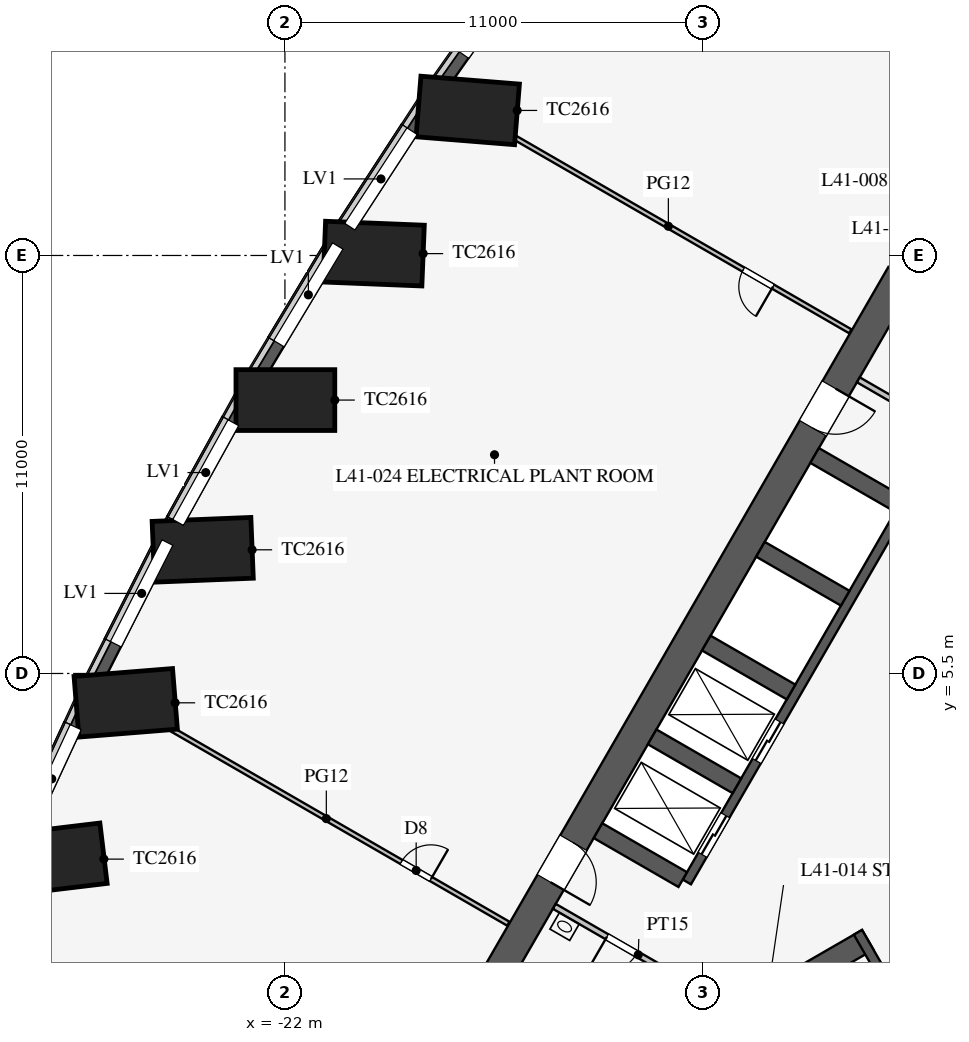
"""IFC4 building model, lengths in metres.
Left out: names, types, materials, properties, quantities, classifications, styles, units other than length and angle.
Written with IfcOpenShell. Run it as: python <this file> out.ifc"""

import sys

from ifc_helpers import new_model, si_unit, direction, frame, frame_2d, origin, origin_2d, place, context, subcontext, project, spatial, polyline, rectangle, outline, extrude, clip, halfspace, element, fill, save


model = new_model("IFC4")
c1 = context("Model", 3, precision=1e-05, world=origin(), true_north=direction((0.0, 1.0)))
c2 = subcontext(c1, "Body", "Model", "MODEL_VIEW")
j1 = project(units=[si_unit("LENGTHUNIT", "METRE"), si_unit("PLANEANGLEUNIT", "RADIAN")], contexts=[c1])
p1 = place(None, origin())
s1 = spatial("IfcSite", under=j1, at=p1, CompositionType="ELEMENT")
p2 = place(p1, origin())
s2 = spatial("IfcBuilding", under=s1, at=p2, CompositionType="ELEMENT")
p3 = place(p2, frame((0.0, 0.0, 178.7)))
s3 = spatial("IfcBuildingStorey", under=s2, at=p3, CompositionType="ELEMENT", Elevation=178.7)
p4 = place(p3, frame((-17.43, 20.456, 0.0), z_axis=(0.195428167391, -0.112817153021, 0.974207432416), x_axis=(-0.565774582808, -0.824362784845, 0.018031095686)))
e1 = element("IfcColumn", 1, at=p4, inside=s3, PredefinedType="COLUMN", context=c2, shape_type="Clipping", body=[
    clip(clip(extrude(rectangle(XDim=2.6, YDim=1.6, at=origin_2d()), origin(), (0.0, 0.0, 1.0), 6.159), halfspace(frame((0.0, 0.0, 0.21), z_axis=(1.0393805708591025e-05, 1.5065167287081627e-05, 0.9999999998325048), x_axis=(0.0, 0.9999999998865204, -1.5065167287895381e-05)), True)), halfspace(frame((0.0, 0.0, 5.949), z_axis=(-1.0393805708591025e-05, -1.5065167287081627e-05, -0.9999999998325048), x_axis=(0.0, -0.9999999998865204, 1.5065167287895381e-05)), True)),
])
p5 = place(p3, frame((-19.893, 16.681, 0.0), z_axis=(0.186289343802, -0.107569380049, 0.976588505391), x_axis=(-0.533517685828, -0.845745042504, 0.008614057662)))
e2 = element("IfcColumn", 2, at=p5, inside=s3, PredefinedType="COLUMN", context=c2, shape_type="Clipping", body=[
    clip(clip(extrude(rectangle(XDim=2.6, YDim=1.6, at=origin_2d()), origin(), (0.0, 0.0, 1.0), 6.144), halfspace(frame((0.0, 0.0, 0.188), z_axis=(-1.3253644547951e-05, 2.4571096812753272e-06, 0.9999999999091518), x_axis=(0.0, 0.9999999999969813, -2.457109681491134e-06)), True)), halfspace(frame((0.0, 0.0, 5.955), z_axis=(1.3253644547951e-05, -2.4571096812753272e-06, -0.9999999999091518), x_axis=(0.0, -0.9999999999969813, 2.457109681491134e-06)), True)),
])
p6 = place(p3, frame((-22.213, 12.825, 0.0), z_axis=(0.183253727016, -0.105824255119, 0.97735321075), x_axis=(-0.500080332001, -0.865979019114, 0.0)))
e3 = element("IfcColumn", 3, at=p6, inside=s3, PredefinedType="COLUMN", context=c2, shape_type="Clipping", body=[
    clip(clip(extrude(rectangle(XDim=2.6, YDim=1.6, at=origin_2d()), origin(), (0.0, 0.0, 1.0), 6.139), halfspace(frame((0.0, 0.0, 0.174), z_axis=(-1.962931837797242e-05, -1.1078215543997016e-05, 0.9999999997459816), x_axis=(0.0, 0.9999999999386366, 1.107821554613129e-05)), True)), halfspace(frame((0.0, 0.0, 5.965), z_axis=(1.962931837797242e-05, 1.1078215543997016e-05, -0.9999999997459816), x_axis=(0.0, -0.9999999999386366, -1.107821554613129e-05)), True)),
])
p7 = place(p3, frame((-24.393, 8.887, 0.0), z_axis=(0.186289343802, -0.107569380049, 0.976588505391), x_axis=(-0.465785984336, -0.884855476791, -0.008614057662)))
e4 = element("IfcColumn", 4, at=p7, inside=s3, PredefinedType="COLUMN", context=c2, shape_type="Clipping", body=[
    clip(clip(extrude(rectangle(XDim=2.6, YDim=1.6, at=origin_2d()), origin(), (0.0, 0.0, 1.0), 6.144), halfspace(frame((0.0, 0.0, 0.189), z_axis=(-1.3014513908404109e-05, 3.509830411391191e-06, 0.9999999999091518), x_axis=(0.0, 0.9999999999938406, -3.5098304116884342e-06)), True)), halfspace(frame((0.0, 0.0, 5.955), z_axis=(1.3014513908404109e-05, -3.509830411391191e-06, -0.9999999999091518), x_axis=(0.0, -0.9999999999938406, 3.5098304116884342e-06)), True)),
])
p8 = place(p3, frame((-26.43, 4.867, 0.0), z_axis=(0.195428167391, -0.112817153021, 0.974207432416), x_axis=(-0.430939361595, -0.902200723906, -0.018031095686)))
e5 = element("IfcColumn", 5, at=p8, inside=s3, PredefinedType="COLUMN", context=c2, shape_type="Clipping", body=[
    clip(clip(extrude(rectangle(XDim=2.6, YDim=1.6, at=origin_2d()), origin(), (0.0, 0.0, 1.0), 6.159), halfspace(frame((0.0, 0.0, 0.21), z_axis=(1.266096880684145e-05, 1.3217046998748039e-05, 0.9999999998325048), x_axis=(0.0, 0.9999999999126549, -1.3217046999807387e-05)), True)), halfspace(frame((0.0, 0.0, 5.949), z_axis=(-1.266096880684145e-05, -1.3217046998748039e-05, -0.9999999998325048), x_axis=(0.0, -0.9999999999126549, 1.3217046999807387e-05)), True)),
])
p9 = place(p3, frame((-28.325, 0.765, 0.0), z_axis=(0.210679538915, -0.121600535668, 0.969962598046), x_axis=(-0.396030042984, -0.91777825869, -0.029039162011)))
e6 = element("IfcColumn", 6, at=p9, inside=s3, PredefinedType="COLUMN", context=c2, shape_type="Clipping", body=[
    clip(clip(extrude(rectangle(XDim=2.6, YDim=1.6, at=origin_2d()), origin(), (0.0, 0.0, 1.0), 6.186), halfspace(frame((0.0, 0.0, 0.239), z_axis=(3.0378180671815358e-05, -3.820048547931165e-06, 0.9999999995312867), x_axis=(0.0, 0.9999999999927036, 3.8200485496938e-06)), True)), halfspace(frame((0.0, 0.0, 5.947), z_axis=(-3.0378180671815358e-05, 3.820048547931165e-06, -0.9999999995312867), x_axis=(0.0, -0.9999999999927036, -3.8200485496938e-06)), True)),
])
p10 = place(p3, frame((-30.077, -3.42, 0.0), z_axis=(0.231966146532, -0.13391860006, 0.963461216355), x_axis=(-0.36168243427, -0.93133790261, -0.042373669911)))
e7 = element("IfcColumn", 7, at=p10, inside=s3, PredefinedType="COLUMN", context=c2, shape_type="Clipping", body=[
    clip(clip(extrude(rectangle(XDim=2.6, YDim=1.6, at=origin_2d()), origin(), (0.0, 0.0, 1.0), 6.228), halfspace(frame((0.0, 0.0, 0.278), z_axis=(6.917197328398794e-06, 4.213036003897219e-06, 0.9999999999672015), x_axis=(0.0, 0.9999999999911252, -4.213036003998011e-06)), True)), halfspace(frame((0.0, 0.0, 5.95), z_axis=(-6.917197328398794e-06, -4.213036003897219e-06, -0.9999999999672015), x_axis=(0.0, -0.9999999999911252, 4.213036003998011e-06)), True)),
])
p11 = place(p3, frame((-5.773, 16.0, 0.0), z_axis=(0.0, 0.0, 1.0), x_axis=(-0.500002442456, -0.866023993627, 0.0)))
e8 = element("IfcWall", 8, at=p11, inside=s3, PredefinedType="SHEAR", context=c2, shape_type="SweptSolid", body=[
    extrude(rectangle(XDim=21.939, YDim=0.8, at=frame_2d((10.97, 0.0))), origin(), (0.0, 0.0, 1.0), 6.0),
])
p12 = place(p11, frame((17.27, 0.0, 0.0)))
e9 = element("IfcOpeningElement", 9, at=p12, cuts=e8, PredefinedType="OPENING", context=c2, shape_type="SweptSolid", body=[
    extrude(rectangle(XDim=1.2, YDim=2.1, at=frame_2d((0.6, 1.05))), frame((0.0, 0.41, 0.0), z_axis=(0.0, -1.0, 0.0), x_axis=(1.0, 0.0, 0.0)), (0.0, 0.0, 1.0), 0.82),
])
p13 = place(p11, frame((3.47, 0.0, 0.0)))
e10 = element("IfcOpeningElement", 10, at=p13, cuts=e8, PredefinedType="OPENING", context=c2, shape_type="SweptSolid", body=[
    extrude(rectangle(XDim=1.2, YDim=2.1, at=frame_2d((0.6, 1.05))), frame((0.0, 0.41, 0.0), z_axis=(0.0, -1.0, 0.0), x_axis=(1.0, 0.0, 0.0)), (0.0, 0.0, 1.0), 0.82),
])
p14 = place(p3, frame((-5.724, 9.886, 0.0), z_axis=(0.0, 0.0, 1.0), x_axis=(-0.500001763848, -0.866024385424, 0.0)))
e11 = element("IfcWall", 11, at=p14, inside=s3, PredefinedType="SHEAR", context=c2, shape_type="SweptSolid", body=[
    extrude(rectangle(XDim=11.4, YDim=0.25, at=frame_2d((5.7, 0.0))), origin(), (0.0, 0.0, 1.0), 6.0),
])
p15 = place(p14, frame((6.525, 0.0, 0.0)))
e12 = element("IfcOpeningElement", 12, at=p15, cuts=e11, PredefinedType="OPENING", context=c2, shape_type="SweptSolid", body=[
    extrude(rectangle(XDim=1.2, YDim=2.2, at=frame_2d((0.6, 1.1))), frame((0.0, 0.135, 0.0), z_axis=(0.0, -1.0, 0.0), x_axis=(1.0, 0.0, 0.0)), (0.0, 0.0, 1.0), 0.27),
])
p16 = place(p14, frame((9.375, 0.0, 0.0)))
e13 = element("IfcOpeningElement", 13, at=p16, cuts=e11, PredefinedType="OPENING", context=c2, shape_type="SweptSolid", body=[
    extrude(rectangle(XDim=1.2, YDim=2.2, at=frame_2d((0.6, 1.1))), frame((0.0, 0.135, 0.0), z_axis=(0.0, -1.0, 0.0), x_axis=(1.0, 0.0, 0.0)), (0.0, 0.0, 1.0), 0.27),
])
p17 = place(p3, frame((-5.832, 9.949, 0.0), z_axis=(0.0, 0.0, 1.0), x_axis=(-0.866029291668, 0.499993265928, 0.0)))
e14 = element("IfcWall", 14, at=p17, inside=s3, PredefinedType="SHEAR", context=c2, shape_type="SweptSolid", body=[
    extrude(rectangle(XDim=2.575, YDim=0.45, at=frame_2d((1.288, 0.0))), origin(), (0.0, 0.0, 1.0), 6.0),
])
for number, where, z_axis, x_axis in (
    (15, (-7.257, 7.481, 0.0), (0.0, 0.0, 1.0), (-0.866, 0.5, 0.0)),
    (16, (-8.682, 5.012, 0.0), (0.0, 0.0, 1.0), (-0.866, 0.5, 0.0)),
    (17, (-10.107, 2.544, 0.0), (0.0, 0.0, 1.0), (-0.866, 0.5, 0.0)),
    (18, (-11.532, 0.076, 0.0), (0.0, 0.0, 1.0), (-0.866, 0.5, 0.0)),
):
    element("IfcWall", number, at=place(p3, frame(where, z_axis=z_axis, x_axis=x_axis)), inside=s3, PredefinedType="SHEAR", context=c2, shape_type="SweptSolid", body=[
        extrude(rectangle(XDim=2.575, YDim=0.45, at=frame_2d((1.288, 0.0))), origin(), (0.0, 0.0, 1.0), 6.0),
    ])
p18 = place(p3, frame((-6.663, -1.509, 0.0), z_axis=(0.0, 0.0, 1.0), x_axis=(-0.866019375473, -0.500010441196, 0.0)))
e19 = element("IfcWall", 19, at=p18, inside=s3, PredefinedType="SHEAR", context=c2, shape_type="SweptSolid", body=[
    extrude(rectangle(XDim=9.075, YDim=0.6, at=frame_2d((4.538, 0.0))), origin(), (0.0, 0.0, 1.0), 6.0),
])
p19 = place(p3, frame((-6.922, -1.312, 0.0), z_axis=(0.0, 0.0, 1.0), x_axis=(0.499984536904, -0.866034331223, 0.0)))
e20 = element("IfcWall", 20, at=p19, inside=s3, PredefinedType="SHEAR", context=c2, shape_type="SweptSolid", body=[
    extrude(rectangle(XDim=4.65, YDim=0.25, at=frame_2d((2.325, 0.0))), origin(), (0.0, 0.0, 1.0), 6.0),
])
p20 = place(p19, frame((1.525, 0.0, 0.0)))
e21 = element("IfcOpeningElement", 21, at=p20, cuts=e20, PredefinedType="OPENING", context=c2, shape_type="SweptSolid", body=[
    extrude(rectangle(XDim=1.6, YDim=2.1, at=frame_2d((0.8, 1.05))), frame((0.0, 0.135, 0.0), z_axis=(0.0, -1.0, 0.0), x_axis=(1.0, 0.0, 0.0)), (0.0, 0.0, 1.0), 0.27),
])
p21 = place(p3, frame((-15.392, 24.475, 0.0), z_axis=(0.0, 0.0, 1.0), x_axis=(-0.575987178736, -0.817458726745, 0.0)))
e22 = element("IfcWall", 22, at=p21, inside=s3, PredefinedType="SOLIDWALL", context=c2, shape_type="SweptSolid", body=[
    extrude(rectangle(XDim=4.518, YDim=0.3, at=frame_2d((2.259, 0.0))), origin(), (0.0, 0.0, 1.0), 5.8),
])
p22 = place(p21, frame((0.3, 0.0, 3.5)))
e23 = element("IfcOpeningElement", 23, at=p22, cuts=e22, PredefinedType="OPENING", context=c2, shape_type="SweptSolid", body=[
    extrude(rectangle(XDim=3.0, YDim=2.0, at=frame_2d((1.5, 1.0))), frame((0.0, 0.16, 0.0), z_axis=(0.0, -1.0, 0.0), x_axis=(1.0, 0.0, 0.0)), (0.0, 0.0, 1.0), 0.32),
])
p23 = place(p3, frame((-17.995, 20.782, 0.0), z_axis=(0.0, 0.0, 1.0), x_axis=(-0.546107481908, -0.83771511757, 0.0)))
e24 = element("IfcWall", 24, at=p23, inside=s3, PredefinedType="SOLIDWALL", context=c2, shape_type="SweptSolid", body=[
    extrude(rectangle(XDim=4.507, YDim=0.3, at=frame_2d((2.253, 0.0))), origin(), (0.0, 0.0, 1.0), 5.8),
])
p24 = place(p23, frame((1.207, 0.0, 3.5)))
e25 = element("IfcOpeningElement", 25, at=p24, cuts=e24, PredefinedType="OPENING", context=c2, shape_type="SweptSolid", body=[
    extrude(rectangle(XDim=3.0, YDim=2.0, at=frame_2d((1.5, 1.0))), frame((0.0, 0.16, 0.0), z_axis=(0.0, -1.0, 0.0), x_axis=(1.0, 0.0, 0.0)), (0.0, 0.0, 1.0), 0.32),
])
p25 = place(p3, frame((-20.456, 17.006, 0.0), z_axis=(0.0, 0.0, 1.0), x_axis=(-0.515508537432, -0.856884442521, 0.0)))
e26 = element("IfcWall", 26, at=p25, inside=s3, PredefinedType="SOLIDWALL", context=c2, shape_type="SweptSolid", body=[
    extrude(rectangle(XDim=4.5, YDim=0.3, at=frame_2d((2.25, 0.0))), origin(), (0.0, 0.0, 1.0), 5.8),
])
p26 = place(p25, frame((0.3, 0.0, 3.5)))
e27 = element("IfcOpeningElement", 27, at=p26, cuts=e26, PredefinedType="OPENING", context=c2, shape_type="SweptSolid", body=[
    extrude(rectangle(XDim=3.0, YDim=2.0, at=frame_2d((1.5, 1.0))), frame((0.0, 0.16, 0.0), z_axis=(0.0, -1.0, 0.0), x_axis=(1.0, 0.0, 0.0)), (0.0, 0.0, 1.0), 0.32),
])
p27 = place(p3, frame((-22.776, 13.15, 0.0), z_axis=(0.0, 0.0, 1.0), x_axis=(-0.48433441842, -0.874882947104, 0.0)))
e28 = element("IfcWall", 28, at=p27, inside=s3, PredefinedType="SOLIDWALL", context=c2, shape_type="SweptSolid", body=[
    extrude(rectangle(XDim=4.501, YDim=0.3, at=frame_2d((2.25, 0.0))), origin(), (0.0, 0.0, 1.0), 5.8),
])
p28 = place(p27, frame((1.201, 0.0, 3.5)))
e29 = element("IfcOpeningElement", 29, at=p28, cuts=e28, PredefinedType="OPENING", context=c2, shape_type="SweptSolid", body=[
    extrude(rectangle(XDim=3.0, YDim=2.0, at=frame_2d((1.5, 1.0))), frame((0.0, 0.16, 0.0), z_axis=(0.0, -1.0, 0.0), x_axis=(1.0, 0.0, 0.0)), (0.0, 0.0, 1.0), 0.32),
])
p29 = place(p3, frame((-24.956, 9.212, 0.0), z_axis=(0.0, 0.0, 1.0), x_axis=(-0.452406735601, -0.891811720927, 0.0)))
e30 = element("IfcWall", 30, at=p29, inside=s3, PredefinedType="SOLIDWALL", context=c2, shape_type="SweptSolid", body=[
    extrude(rectangle(XDim=4.507, YDim=0.3, at=frame_2d((2.253, 0.0))), origin(), (0.0, 0.0, 1.0), 5.8),
])
p30 = place(p29, frame((0.3, 0.0, 3.5)))
e31 = element("IfcOpeningElement", 31, at=p30, cuts=e30, PredefinedType="OPENING", context=c2, shape_type="SweptSolid", body=[
    extrude(rectangle(XDim=3.0, YDim=2.0, at=frame_2d((1.5, 1.0))), frame((0.0, 0.16, 0.0), z_axis=(0.0, -1.0, 0.0), x_axis=(1.0, 0.0, 0.0)), (0.0, 0.0, 1.0), 0.32),
])
p31 = place(p3, frame((-26.995, 5.193, 0.0), z_axis=(0.0, 0.0, 1.0), x_axis=(-0.419948870618, -0.907547765171, 0.0)))
e32 = element("IfcWall", 32, at=p31, inside=s3, PredefinedType="SOLIDWALL", context=c2, shape_type="SweptSolid", body=[
    extrude(rectangle(XDim=4.518, YDim=0.3, at=frame_2d((2.259, 0.0))), origin(), (0.0, 0.0, 1.0), 5.8),
])
p32 = place(p31, frame((1.218, 0.0, 3.5)))
e33 = element("IfcOpeningElement", 33, at=p32, cuts=e32, PredefinedType="OPENING", context=c2, shape_type="SweptSolid", body=[
    extrude(rectangle(XDim=3.0, YDim=2.0, at=frame_2d((1.5, 1.0))), frame((0.0, 0.16, 0.0), z_axis=(0.0, -1.0, 0.0), x_axis=(1.0, 0.0, 0.0)), (0.0, 0.0, 1.0), 0.32),
])
p33 = place(p3, frame((-10.495, -3.178, 0.0), z_axis=(0.0, 0.0, 1.0), x_axis=(-0.86602216432, 0.500005610874, 0.0)))
e34 = element("IfcWall", 34, at=p33, inside=s3, PredefinedType="PARTITIONING", context=c2, shape_type="SweptSolid", body=[
    extrude(rectangle(XDim=5.1, YDim=0.15, at=frame_2d((2.55, 0.0))), origin(), (0.0, 0.0, 1.0), 5.8),
])
p34 = place(p33, frame((2.6, 0.0, 0.0)))
e35 = element("IfcOpeningElement", 35, at=p34, cuts=e34, PredefinedType="OPENING", context=c2, shape_type="SweptSolid", body=[
    extrude(rectangle(XDim=0.9, YDim=2.1, at=frame_2d((0.45, 1.05))), frame((0.0, 0.085, 0.0), z_axis=(0.0, -1.0, 0.0), x_axis=(1.0, 0.0, 0.0)), (0.0, 0.0, 1.0), 0.17),
])
p35 = place(p3, frame((-2.495, 10.678, 0.0), z_axis=(0.0, 0.0, 1.0), x_axis=(-0.86602216432, 0.500005610874, 0.0)))
e36 = element("IfcWall", 36, at=p35, inside=s3, PredefinedType="PARTITIONING", context=c2, shape_type="SweptSolid", body=[
    extrude(rectangle(XDim=5.1, YDim=0.15, at=frame_2d((2.55, 0.0))), origin(), (0.0, 0.0, 1.0), 5.8),
])
p36 = place(p35, frame((2.6, 0.0, 0.0)))
e37 = element("IfcOpeningElement", 37, at=p36, cuts=e36, PredefinedType="OPENING", context=c2, shape_type="SweptSolid", body=[
    extrude(rectangle(XDim=0.9, YDim=2.1, at=frame_2d((0.45, 1.05))), frame((0.0, 0.085, 0.0), z_axis=(0.0, -1.0, 0.0), x_axis=(1.0, 0.0, 0.0)), (0.0, 0.0, 1.0), 0.17),
])
for number, where, z_axis, x_axis in (
    (38, (-25.122, 4.112, 0.0), (0.0, 0.0, 1.0), (-0.866, 0.5, 0.0)),
    (39, (-16.122, 19.7, 0.0), (0.0, 0.0, 1.0), (-0.866, 0.5, 0.0)),
):
    element("IfcWall", number, at=place(p3, frame(where, z_axis=z_axis, x_axis=x_axis)), inside=s3, PredefinedType="PARTITIONING", context=c2, shape_type="SweptSolid", body=[
        extrude(outline(polyline([(0.0, 0.0), (0.667, 0.0), (0.667, 0.05), (0.0, 2.9), (0.0, 0.0)])), frame((0.0, 0.06, 0.0), z_axis=(0.0, -1.0, 0.0), x_axis=(1.0, 0.0, 0.0)), (0.0, 0.0, 1.0), 0.12),
    ])
p37 = place(p3, frame((-16.122, -1.084, 0.0), z_axis=(0.0, 0.0, 1.0), x_axis=(-0.866025583565, 0.49999968861, 0.0)))
e40 = element("IfcWall", 40, at=p37, inside=s3, PredefinedType="PARTITIONING", context=c2, shape_type="SweptSolid", body=[
    extrude(rectangle(XDim=10.393, YDim=0.12, at=frame_2d((5.196, 0.0))), origin(), (0.0, 0.0, 1.0), 2.9),
])
p38 = place(p37, frame((2.35, 0.0, 0.0)))
e41 = element("IfcOpeningElement", 41, at=p38, cuts=e40, PredefinedType="OPENING", context=c2, shape_type="SweptSolid", body=[
    extrude(rectangle(XDim=0.9, YDim=2.1, at=frame_2d((0.45, 1.05))), frame((0.0, 0.07, 0.0), z_axis=(0.0, -1.0, 0.0), x_axis=(1.0, 0.0, 0.0)), (0.0, 0.0, 1.0), 0.14),
])
p39 = place(p3, frame((-7.122, 14.504, 0.0), z_axis=(0.0, 0.0, 1.0), x_axis=(-0.866025583565, 0.49999968861, 0.0)))
e42 = element("IfcWall", 42, at=p39, inside=s3, PredefinedType="PARTITIONING", context=c2, shape_type="SweptSolid", body=[
    extrude(rectangle(XDim=10.393, YDim=0.12, at=frame_2d((5.196, 0.0))), origin(), (0.0, 0.0, 1.0), 2.9),
])
p40 = place(p39, frame((2.35, 0.0, 0.0)))
e43 = element("IfcOpeningElement", 43, at=p40, cuts=e42, PredefinedType="OPENING", context=c2, shape_type="SweptSolid", body=[
    extrude(rectangle(XDim=0.9, YDim=2.1, at=frame_2d((0.45, 1.05))), frame((0.0, 0.07, 0.0), z_axis=(0.0, -1.0, 0.0), x_axis=(1.0, 0.0, 0.0)), (0.0, 0.0, 1.0), 0.14),
])
p41 = place(p22, origin())
e44 = element("IfcWindow", 44, at=p41, inside=s3, PartitioningType="SINGLE_PANEL", PredefinedType="USERDEFINED", context=c2, shape_type="SweptSolid", body=[
    extrude(rectangle(XDim=3.0, YDim=2.0, at=frame_2d((1.5, 1.0))), frame((0.0, 0.03, 0.0), z_axis=(0.0, -1.0, 0.0), x_axis=(1.0, 0.0, 0.0)), (0.0, 0.0, 1.0), 0.06),
])
fill(e23, e44)
p42 = place(p24, origin())
e45 = element("IfcWindow", 45, at=p42, inside=s3, PartitioningType="SINGLE_PANEL", PredefinedType="USERDEFINED", context=c2, shape_type="SweptSolid", body=[
    extrude(rectangle(XDim=3.0, YDim=2.0, at=frame_2d((1.5, 1.0))), frame((0.0, 0.03, 0.0), z_axis=(0.0, -1.0, 0.0), x_axis=(1.0, 0.0, 0.0)), (0.0, 0.0, 1.0), 0.06),
])
fill(e25, e45)
p43 = place(p26, origin())
e46 = element("IfcWindow", 46, at=p43, inside=s3, PartitioningType="SINGLE_PANEL", PredefinedType="USERDEFINED", context=c2, shape_type="SweptSolid", body=[
    extrude(rectangle(XDim=3.0, YDim=2.0, at=frame_2d((1.5, 1.0))), frame((0.0, 0.03, 0.0), z_axis=(0.0, -1.0, 0.0), x_axis=(1.0, 0.0, 0.0)), (0.0, 0.0, 1.0), 0.06),
])
fill(e27, e46)
p44 = place(p28, origin())
e47 = element("IfcWindow", 47, at=p44, inside=s3, PartitioningType="SINGLE_PANEL", PredefinedType="USERDEFINED", context=c2, shape_type="SweptSolid", body=[
    extrude(rectangle(XDim=3.0, YDim=2.0, at=frame_2d((1.5, 1.0))), frame((0.0, 0.03, 0.0), z_axis=(0.0, -1.0, 0.0), x_axis=(1.0, 0.0, 0.0)), (0.0, 0.0, 1.0), 0.06),
])
fill(e29, e47)
p45 = place(p30, origin())
e48 = element("IfcWindow", 48, at=p45, inside=s3, PartitioningType="SINGLE_PANEL", PredefinedType="USERDEFINED", context=c2, shape_type="SweptSolid", body=[
    extrude(rectangle(XDim=3.0, YDim=2.0, at=frame_2d((1.5, 1.0))), frame((0.0, 0.03, 0.0), z_axis=(0.0, -1.0, 0.0), x_axis=(1.0, 0.0, 0.0)), (0.0, 0.0, 1.0), 0.06),
])
fill(e31, e48)
p46 = place(p32, origin())
e49 = element("IfcWindow", 49, at=p46, inside=s3, PartitioningType="SINGLE_PANEL", PredefinedType="USERDEFINED", context=c2, shape_type="SweptSolid", body=[
    extrude(rectangle(XDim=3.0, YDim=2.0, at=frame_2d((1.5, 1.0))), frame((0.0, 0.03, 0.0), z_axis=(0.0, -1.0, 0.0), x_axis=(1.0, 0.0, 0.0)), (0.0, 0.0, 1.0), 0.06),
])
fill(e33, e49)
p47 = place(p34, origin())
e50 = element("IfcDoor", 50, at=p47, inside=s3, OperationType="SINGLE_SWING_RIGHT", PredefinedType="DOOR", context=c2, shape_type="SweptSolid", body=[
    extrude(rectangle(XDim=0.9, YDim=2.1, at=frame_2d((0.45, 1.05))), frame((0.0, 0.025, 0.0), z_axis=(0.0, -1.0, 0.0), x_axis=(1.0, 0.0, 0.0)), (0.0, 0.0, 1.0), 0.05),
])
fill(e35, e50)
p48 = place(p12, origin())
e51 = element("IfcDoor", 51, at=p48, inside=s3, OperationType="SINGLE_SWING_RIGHT", PredefinedType="DOOR", context=c2, shape_type="SweptSolid", body=[
    extrude(rectangle(XDim=1.2, YDim=2.1, at=frame_2d((0.6, 1.05))), frame((0.0, 0.025, 0.0), z_axis=(0.0, -1.0, 0.0), x_axis=(1.0, 0.0, 0.0)), (0.0, 0.0, 1.0), 0.05),
])
fill(e9, e51)
p49 = place(p13, origin())
e52 = element("IfcDoor", 52, at=p49, inside=s3, OperationType="SINGLE_SWING_LEFT", PredefinedType="DOOR", context=c2, shape_type="SweptSolid", body=[
    extrude(rectangle(XDim=1.2, YDim=2.1, at=frame_2d((0.6, 1.05))), frame((0.0, 0.025, 0.0), z_axis=(0.0, -1.0, 0.0), x_axis=(1.0, 0.0, 0.0)), (0.0, 0.0, 1.0), 0.05),
])
fill(e10, e52)
p50 = place(p38, frame((0.9, 0.0, 0.0), z_axis=(0.0, 0.0, 1.0), x_axis=(-1.0, 0.0, 0.0)))
e53 = element("IfcDoor", 53, at=p50, inside=s3, OperationType="SINGLE_SWING_RIGHT", PredefinedType="DOOR", context=c2, shape_type="SweptSolid", body=[
    extrude(rectangle(XDim=0.9, YDim=2.1, at=frame_2d((0.45, 1.05))), frame((0.0, 0.025, 0.0), z_axis=(0.0, -1.0, 0.0), x_axis=(1.0, 0.0, 0.0)), (0.0, 0.0, 1.0), 0.05),
])
fill(e41, e53)
p51 = place(p40, origin())
e54 = element("IfcDoor", 54, at=p51, inside=s3, OperationType="SINGLE_SWING_LEFT", PredefinedType="DOOR", context=c2, shape_type="SweptSolid", body=[
    extrude(rectangle(XDim=0.9, YDim=2.1, at=frame_2d((0.45, 1.05))), frame((0.0, 0.025, 0.0), z_axis=(0.0, -1.0, 0.0), x_axis=(1.0, 0.0, 0.0)), (0.0, 0.0, 1.0), 0.05),
])
fill(e43, e54)
p52 = place(p15, origin())
e55 = element("IfcDoor", 55, at=p52, inside=s3, OperationType="DOUBLE_DOOR_SLIDING", PredefinedType="DOOR", context=c2, shape_type="SweptSolid", body=[
    extrude(rectangle(XDim=1.2, YDim=2.2, at=frame_2d((0.6, 1.1))), frame((0.0, 0.025, 0.0), z_axis=(0.0, -1.0, 0.0), x_axis=(1.0, 0.0, 0.0)), (0.0, 0.0, 1.0), 0.05),
])
fill(e12, e55)
p53 = place(p16, origin())
e56 = element("IfcDoor", 56, at=p53, inside=s3, OperationType="DOUBLE_DOOR_SLIDING", PredefinedType="DOOR", context=c2, shape_type="SweptSolid", body=[
    extrude(rectangle(XDim=1.2, YDim=2.2, at=frame_2d((0.6, 1.1))), frame((0.0, 0.025, 0.0), z_axis=(0.0, -1.0, 0.0), x_axis=(1.0, 0.0, 0.0)), (0.0, 0.0, 1.0), 0.05),
])
fill(e13, e56)
save(model, sys.argv[1])
